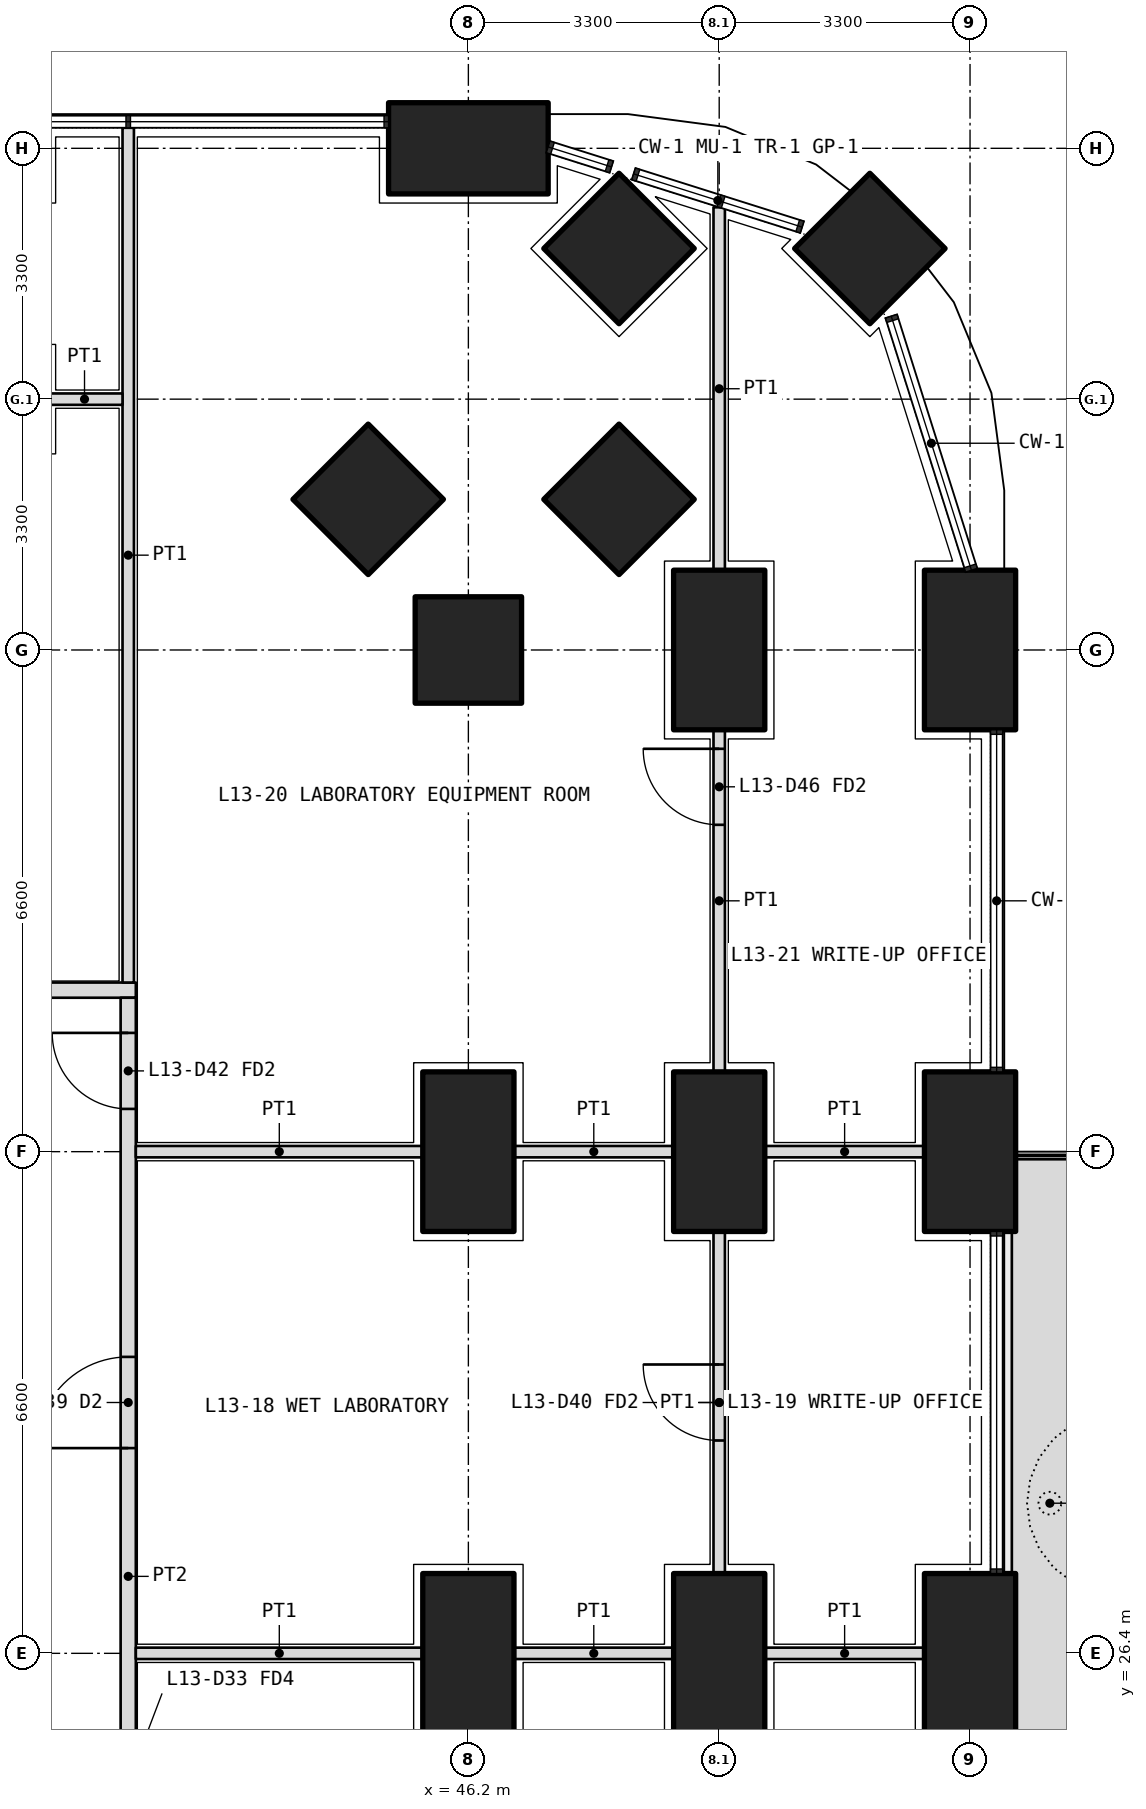
"""IFC4 building model, lengths in metres.
Left out: names, types, materials, properties, quantities, classifications, styles, units other than length and angle.
Written with IfcOpenShell. Run it as: python <this file> out.ifc"""

import sys

from ifc_helpers import new_model, si_unit, direction, frame, frame_2d, origin, origin_2d, place, context, subcontext, project, spatial, polyline, rectangle, outline, extrude, element, fill, save


model = new_model("IFC4")
c1 = context("Model", 3, precision=1e-05, world=origin(), true_north=direction((0.0, 1.0)))
c2 = subcontext(c1, "Body", "Model", "MODEL_VIEW")
j1 = project(units=[si_unit("LENGTHUNIT", "METRE"), si_unit("PLANEANGLEUNIT", "RADIAN")], contexts=[c1])
p1 = place(None, origin())
s1 = spatial("IfcSite", under=j1, at=p1, CompositionType="ELEMENT")
p2 = place(p1, origin())
s2 = spatial("IfcBuilding", under=s1, at=p2, CompositionType="ELEMENT")
p3 = place(p2, frame((0.0, 0.0, 59.1)))
s3 = spatial("IfcBuildingStorey", under=s2, at=p3, CompositionType="ELEMENT", Elevation=59.1)
p4 = place(p3, frame((51.482, 44.882, 0.0), z_axis=(0.0, 0.0, 1.0), x_axis=(0.707106781187, 0.707106781187, 0.0)))
e1 = element("IfcColumn", 1, at=p4, inside=s3, PredefinedType="COLUMN", context=c2, shape_type="SweptSolid", body=[
    extrude(rectangle(XDim=1.4, YDim=1.4, at=origin_2d()), origin(), (0.0, 0.0, 1.0), 4.2),
])
for number, where, z_axis, x_axis in (
    (2, (52.8, 26.4, 0.0), (0.0, 0.0, 1.0), (0.0, 1.0, 0.0)),
    (3, (52.8, 33.0, 0.0), (0.0, 0.0, 1.0), (0.0, 1.0, 0.0)),
    (4, (52.8, 39.6, 0.0), (0.0, 0.0, 1.0), (0.0, 1.0, 0.0)),
    (5, (46.2, 46.2, 0.0), (0.0, 0.0, 1.0), (1.0, 0.0, 0.0)),
):
    element("IfcColumn", number, at=place(p3, frame(where, z_axis=z_axis, x_axis=x_axis)), inside=s3, PredefinedType="COLUMN", context=c2, shape_type="SweptSolid", body=[
        extrude(rectangle(XDim=2.1, YDim=1.2, at=origin_2d()), origin(), (0.0, 0.0, 1.0), 4.2),
    ])
for number, where, z_axis, x_axis in (
    (6, (46.2, 39.6, 0.0), (0.0, 0.0, 1.0), (1.0, 0.0, 0.0)),
    (7, (48.182, 44.882, 0.0), (0.0, 0.0, 1.0), (0.707, 0.707, 0.0)),
):
    element("IfcColumn", number, at=place(p3, frame(where, z_axis=z_axis, x_axis=x_axis)), inside=s3, PredefinedType="COLUMN", context=c2, shape_type="SweptSolid", body=[
        extrude(rectangle(XDim=1.4, YDim=1.4, at=origin_2d()), origin(), (0.0, 0.0, 1.0), 4.2),
    ])
for number, where, z_axis, x_axis in (
    (8, (49.5, 26.4, 0.0), (0.0, 0.0, 1.0), (0.0, 1.0, 0.0)),
    (9, (49.5, 33.0, 0.0), (0.0, 0.0, 1.0), (0.0, 1.0, 0.0)),
    (10, (49.5, 39.6, 0.0), (0.0, 0.0, 1.0), (0.0, 1.0, 0.0)),
):
    element("IfcColumn", number, at=place(p3, frame(where, z_axis=z_axis, x_axis=x_axis)), inside=s3, PredefinedType="COLUMN", context=c2, shape_type="SweptSolid", body=[
        extrude(rectangle(XDim=2.1, YDim=1.2, at=origin_2d()), origin(), (0.0, 0.0, 1.0), 4.2),
    ])
for number, where, z_axis, x_axis in (
    (11, (48.182, 41.582, 0.0), (0.0, 0.0, 1.0), (0.707, 0.707, 0.0)),
    (12, (44.882, 41.582, 0.0), (0.0, 0.0, 1.0), (0.707, 0.707, 0.0)),
):
    element("IfcColumn", number, at=place(p3, frame(where, z_axis=z_axis, x_axis=x_axis)), inside=s3, PredefinedType="COLUMN", context=c2, shape_type="SweptSolid", body=[
        extrude(rectangle(XDim=1.4, YDim=1.4, at=origin_2d()), origin(), (0.0, 0.0, 1.0), 4.2),
    ])
for number, where, z_axis, x_axis in (
    (13, (46.2, 26.4, 0.0), (0.0, 0.0, 1.0), (0.0, 1.0, 0.0)),
    (14, (46.2, 33.0, 0.0), (0.0, 0.0, 1.0), (0.0, 1.0, 0.0)),
):
    element("IfcColumn", number, at=place(p3, frame(where, z_axis=z_axis, x_axis=x_axis)), inside=s3, PredefinedType="COLUMN", context=c2, shape_type="SweptSolid", body=[
        extrude(rectangle(XDim=2.1, YDim=1.2, at=origin_2d()), origin(), (0.0, 0.0, 1.0), 4.2),
    ])
p5 = place(p3, origin())
e15 = element("IfcWall", 15, at=p5, inside=s3, PredefinedType="USERDEFINED", context=c2, shape_type="SweptSolid", body=[
    extrude(outline(polyline([(53.35, 23.85), (54.35, 23.85), (54.35, 32.9), (53.35, 32.9), (53.35, 23.85)]), holes=[polyline([(53.5, 24.0), (54.2, 24.0), (54.2, 32.75), (53.5, 32.75), (53.5, 24.0)])]), origin(), (0.0, 0.0, 1.0), 1.05),
])
p6 = place(p3, frame((10.975, 35.125, 0.0), z_axis=(0.0, 0.0, 1.0), x_axis=(1.0, 0.0, 0.0)))
e16 = element("IfcWall", 16, at=p6, inside=s3, PredefinedType="PARTITIONING", context=c2, shape_type="SweptSolid", body=[
    extrude(rectangle(XDim=30.85, YDim=0.2, at=frame_2d((15.425, 0.0))), origin(), (0.0, 0.0, 1.0), 2.85),
])
p7 = place(p6, frame((2.312, 0.0, 0.0)))
e17 = element("IfcOpeningElement", 17, at=p7, cuts=e16, PredefinedType="OPENING", context=c2, shape_type="SweptSolid", body=[
    extrude(rectangle(XDim=1.0, YDim=2.1, at=frame_2d((0.5, 1.05))), frame((0.0, 0.11, 0.0), z_axis=(0.0, -1.0, 0.0), x_axis=(1.0, 0.0, 0.0)), (0.0, 0.0, 1.0), 0.22),
])
p8 = place(p6, frame((13.175, 0.0, 0.0)))
e18 = element("IfcOpeningElement", 18, at=p8, cuts=e16, PredefinedType="OPENING", context=c2, shape_type="SweptSolid", body=[
    extrude(rectangle(XDim=1.2, YDim=2.1, at=frame_2d((0.6, 1.05))), frame((0.0, 0.11, 0.0), z_axis=(0.0, -1.0, 0.0), x_axis=(1.0, 0.0, 0.0)), (0.0, 0.0, 1.0), 0.22),
])
p9 = place(p6, frame((25.788, 0.0, 0.0)))
e19 = element("IfcOpeningElement", 19, at=p9, cuts=e16, PredefinedType="OPENING", context=c2, shape_type="SweptSolid", body=[
    extrude(rectangle(XDim=1.2, YDim=2.1, at=frame_2d((0.6, 1.05))), frame((0.0, 0.11, 0.0), z_axis=(0.0, -1.0, 0.0), x_axis=(1.0, 0.0, 0.0)), (0.0, 0.0, 1.0), 0.22),
])
p10 = place(p3, frame((41.725, 19.8, 0.0), z_axis=(0.0, 0.0, 1.0), x_axis=(0.0, 1.0, 0.0)))
e20 = element("IfcWall", 20, at=p10, inside=s3, PredefinedType="PARTITIONING", context=c2, shape_type="SweptSolid", body=[
    extrude(rectangle(XDim=15.225, YDim=0.2, at=frame_2d((7.612, 0.0))), origin(), (0.0, 0.0, 1.0), 2.85),
])
p11 = place(p10, frame((1.1, 0.0, 0.0)))
e21 = element("IfcOpeningElement", 21, at=p11, cuts=e20, PredefinedType="OPENING", context=c2, shape_type="SweptSolid", body=[
    extrude(rectangle(XDim=1.0, YDim=2.1, at=frame_2d((0.5, 1.05))), frame((0.0, 0.11, 0.0), z_axis=(0.0, -1.0, 0.0), x_axis=(1.0, 0.0, 0.0)), (0.0, 0.0, 1.0), 0.22),
])
p12 = place(p10, frame((4.45, 0.0, 0.0)))
e22 = element("IfcOpeningElement", 22, at=p12, cuts=e20, PredefinedType="OPENING", context=c2, shape_type="SweptSolid", body=[
    extrude(rectangle(XDim=0.9, YDim=2.1, at=frame_2d((0.45, 1.05))), frame((0.0, 0.11, 0.0), z_axis=(0.0, -1.0, 0.0), x_axis=(1.0, 0.0, 0.0)), (0.0, 0.0, 1.0), 0.22),
])
p13 = place(p10, frame((9.3, 0.0, 0.0)))
e23 = element("IfcOpeningElement", 23, at=p13, cuts=e20, PredefinedType="OPENING", context=c2, shape_type="SweptSolid", body=[
    extrude(rectangle(XDim=1.2, YDim=2.1, at=frame_2d((0.6, 1.05))), frame((0.0, 0.11, 0.0), z_axis=(0.0, -1.0, 0.0), x_axis=(1.0, 0.0, 0.0)), (0.0, 0.0, 1.0), 0.22),
])
p14 = place(p10, frame((13.762, 0.0, 0.0)))
e24 = element("IfcOpeningElement", 24, at=p14, cuts=e20, PredefinedType="OPENING", context=c2, shape_type="SweptSolid", body=[
    extrude(rectangle(XDim=1.0, YDim=2.1, at=frame_2d((0.5, 1.05))), frame((0.0, 0.11, 0.0), z_axis=(0.0, -1.0, 0.0), x_axis=(1.0, 0.0, 0.0)), (0.0, 0.0, 1.0), 0.22),
])
p15 = place(p3, frame((41.725, 46.47, 0.0), z_axis=(0.0, 0.0, 1.0), x_axis=(0.0, -1.0, 0.0)))
e25 = element("IfcWall", 25, at=p15, inside=s3, PredefinedType="PARTITIONING", context=c2, shape_type="SweptSolid", body=[
    extrude(rectangle(XDim=11.245, YDim=0.15, at=frame_2d((5.623, 0.0))), origin(), (0.0, 0.0, 1.0), 2.7),
])
p16 = place(p3, frame((49.5, 27.45, 0.0), z_axis=(0.0, 0.0, 1.0), x_axis=(0.0, 1.0, 0.0)))
e26 = element("IfcWall", 26, at=p16, inside=s3, PredefinedType="PARTITIONING", context=c2, shape_type="SweptSolid", body=[
    extrude(rectangle(XDim=4.5, YDim=0.15, at=frame_2d((2.25, 0.0))), origin(), (0.0, 0.0, 1.0), 3.9),
])
p17 = place(p16, frame((1.75, 0.0, 0.0)))
e27 = element("IfcOpeningElement", 27, at=p17, cuts=e26, PredefinedType="OPENING", context=c2, shape_type="SweptSolid", body=[
    extrude(rectangle(XDim=1.0, YDim=2.1, at=frame_2d((0.5, 1.05))), frame((0.0, 0.085, 0.0), z_axis=(0.0, -1.0, 0.0), x_axis=(1.0, 0.0, 0.0)), (0.0, 0.0, 1.0), 0.17),
])
p18 = place(p3, frame((49.5, 34.05, 0.0), z_axis=(0.0, 0.0, 1.0), x_axis=(0.0, 1.0, 0.0)))
e28 = element("IfcWall", 28, at=p18, inside=s3, PredefinedType="PARTITIONING", context=c2, shape_type="SweptSolid", body=[
    extrude(rectangle(XDim=4.5, YDim=0.15, at=frame_2d((2.25, 0.0))), origin(), (0.0, 0.0, 1.0), 3.9),
])
p19 = place(p18, frame((3.25, 0.0, 0.0)))
e29 = element("IfcOpeningElement", 29, at=p19, cuts=e28, PredefinedType="OPENING", context=c2, shape_type="SweptSolid", body=[
    extrude(rectangle(XDim=1.0, YDim=2.1, at=frame_2d((0.5, 1.05))), frame((0.0, 0.085, 0.0), z_axis=(0.0, -1.0, 0.0), x_axis=(1.0, 0.0, 0.0)), (0.0, 0.0, 1.0), 0.17),
])
p20 = place(p3, frame((49.5, 40.65, 0.0), z_axis=(0.0, 0.0, 1.0), x_axis=(0.0, 1.0, 0.0)))
e30 = element("IfcWall", 30, at=p20, inside=s3, PredefinedType="PARTITIONING", context=c2, shape_type="SweptSolid", body=[
    extrude(rectangle(XDim=4.774, YDim=0.15, at=frame_2d((2.387, 0.0))), origin(), (0.0, 0.0, 1.0), 2.7),
])
for number, where, z_axis, x_axis in (
    (31, (52.2, 26.4, 0.0), (0.0, 0.0, 1.0), (-1.0, 0.0, 0.0)),
    (32, (48.9, 26.4, 0.0), (0.0, 0.0, 1.0), (-1.0, 0.0, 0.0)),
):
    element("IfcWall", number, at=place(p3, frame(where, z_axis=z_axis, x_axis=x_axis)), inside=s3, PredefinedType="PARTITIONING", context=c2, shape_type="SweptSolid", body=[
        extrude(rectangle(XDim=2.1, YDim=0.15, at=frame_2d((1.05, 0.0))), origin(), (0.0, 0.0, 1.0), 2.85),
    ])
p21 = place(p3, frame((45.6, 26.4, 0.0), z_axis=(0.0, 0.0, 1.0), x_axis=(-1.0, 0.0, 0.0)))
e33 = element("IfcWall", 33, at=p21, inside=s3, PredefinedType="PARTITIONING", context=c2, shape_type="SweptSolid", body=[
    extrude(rectangle(XDim=3.775, YDim=0.15, at=frame_2d((1.888, 0.0))), origin(), (0.0, 0.0, 1.0), 2.85),
])
for number, where, z_axis, x_axis in (
    (34, (52.2, 33.0, 0.0), (0.0, 0.0, 1.0), (-1.0, 0.0, 0.0)),
    (35, (48.9, 33.0, 0.0), (0.0, 0.0, 1.0), (-1.0, 0.0, 0.0)),
):
    element("IfcWall", number, at=place(p3, frame(where, z_axis=z_axis, x_axis=x_axis)), inside=s3, PredefinedType="PARTITIONING", context=c2, shape_type="SweptSolid", body=[
        extrude(rectangle(XDim=2.1, YDim=0.15, at=frame_2d((1.05, 0.0))), origin(), (0.0, 0.0, 1.0), 2.85),
    ])
p22 = place(p3, frame((45.6, 33.0, 0.0), z_axis=(0.0, 0.0, 1.0), x_axis=(-1.0, 0.0, 0.0)))
e36 = element("IfcWall", 36, at=p22, inside=s3, PredefinedType="PARTITIONING", context=c2, shape_type="SweptSolid", body=[
    extrude(rectangle(XDim=3.775, YDim=0.15, at=frame_2d((1.888, 0.0))), origin(), (0.0, 0.0, 1.0), 2.85),
])
p23 = place(p3, frame((41.65, 42.9, 0.0), z_axis=(0.0, 0.0, 1.0), x_axis=(-1.0, 0.0, 0.0)))
e37 = element("IfcWall", 37, at=p23, inside=s3, PredefinedType="PARTITIONING", context=c2, shape_type="SweptSolid", body=[
    extrude(rectangle(XDim=1.0, YDim=0.15, at=frame_2d((0.5, 0.0))), origin(), (0.0, 0.0, 1.0), 3.9),
])
p24 = place(p13, origin())
e38 = element("IfcDoor", 38, at=p24, inside=s3, OperationType="DOUBLE_DOOR_SINGLE_SWING", PredefinedType="DOOR", context=c2, shape_type="SweptSolid", body=[
    extrude(rectangle(XDim=1.2, YDim=2.1, at=frame_2d((0.6, 1.05))), frame((0.0, 0.025, 0.0), z_axis=(0.0, -1.0, 0.0), x_axis=(1.0, 0.0, 0.0)), (0.0, 0.0, 1.0), 0.05),
])
fill(e23, e38)
p25 = place(p17, origin())
e39 = element("IfcDoor", 39, at=p25, inside=s3, OperationType="SINGLE_SWING_RIGHT", PredefinedType="DOOR", context=c2, shape_type="SweptSolid", body=[
    extrude(rectangle(XDim=1.0, YDim=2.1, at=frame_2d((0.5, 1.05))), frame((0.0, 0.025, 0.0), z_axis=(0.0, -1.0, 0.0), x_axis=(1.0, 0.0, 0.0)), (0.0, 0.0, 1.0), 0.05),
])
fill(e27, e39)
p26 = place(p14, origin())
e40 = element("IfcDoor", 40, at=p26, inside=s3, OperationType="SINGLE_SWING_RIGHT", PredefinedType="DOOR", context=c2, shape_type="SweptSolid", body=[
    extrude(rectangle(XDim=1.0, YDim=2.1, at=frame_2d((0.5, 1.05))), frame((0.0, 0.025, 0.0), z_axis=(0.0, -1.0, 0.0), x_axis=(1.0, 0.0, 0.0)), (0.0, 0.0, 1.0), 0.05),
])
fill(e24, e40)
p27 = place(p19, origin())
e41 = element("IfcDoor", 41, at=p27, inside=s3, OperationType="SINGLE_SWING_RIGHT", PredefinedType="DOOR", context=c2, shape_type="SweptSolid", body=[
    extrude(rectangle(XDim=1.0, YDim=2.1, at=frame_2d((0.5, 1.05))), frame((0.0, 0.025, 0.0), z_axis=(0.0, -1.0, 0.0), x_axis=(1.0, 0.0, 0.0)), (0.0, 0.0, 1.0), 0.05),
])
fill(e29, e41)
save(model, sys.argv[1])
